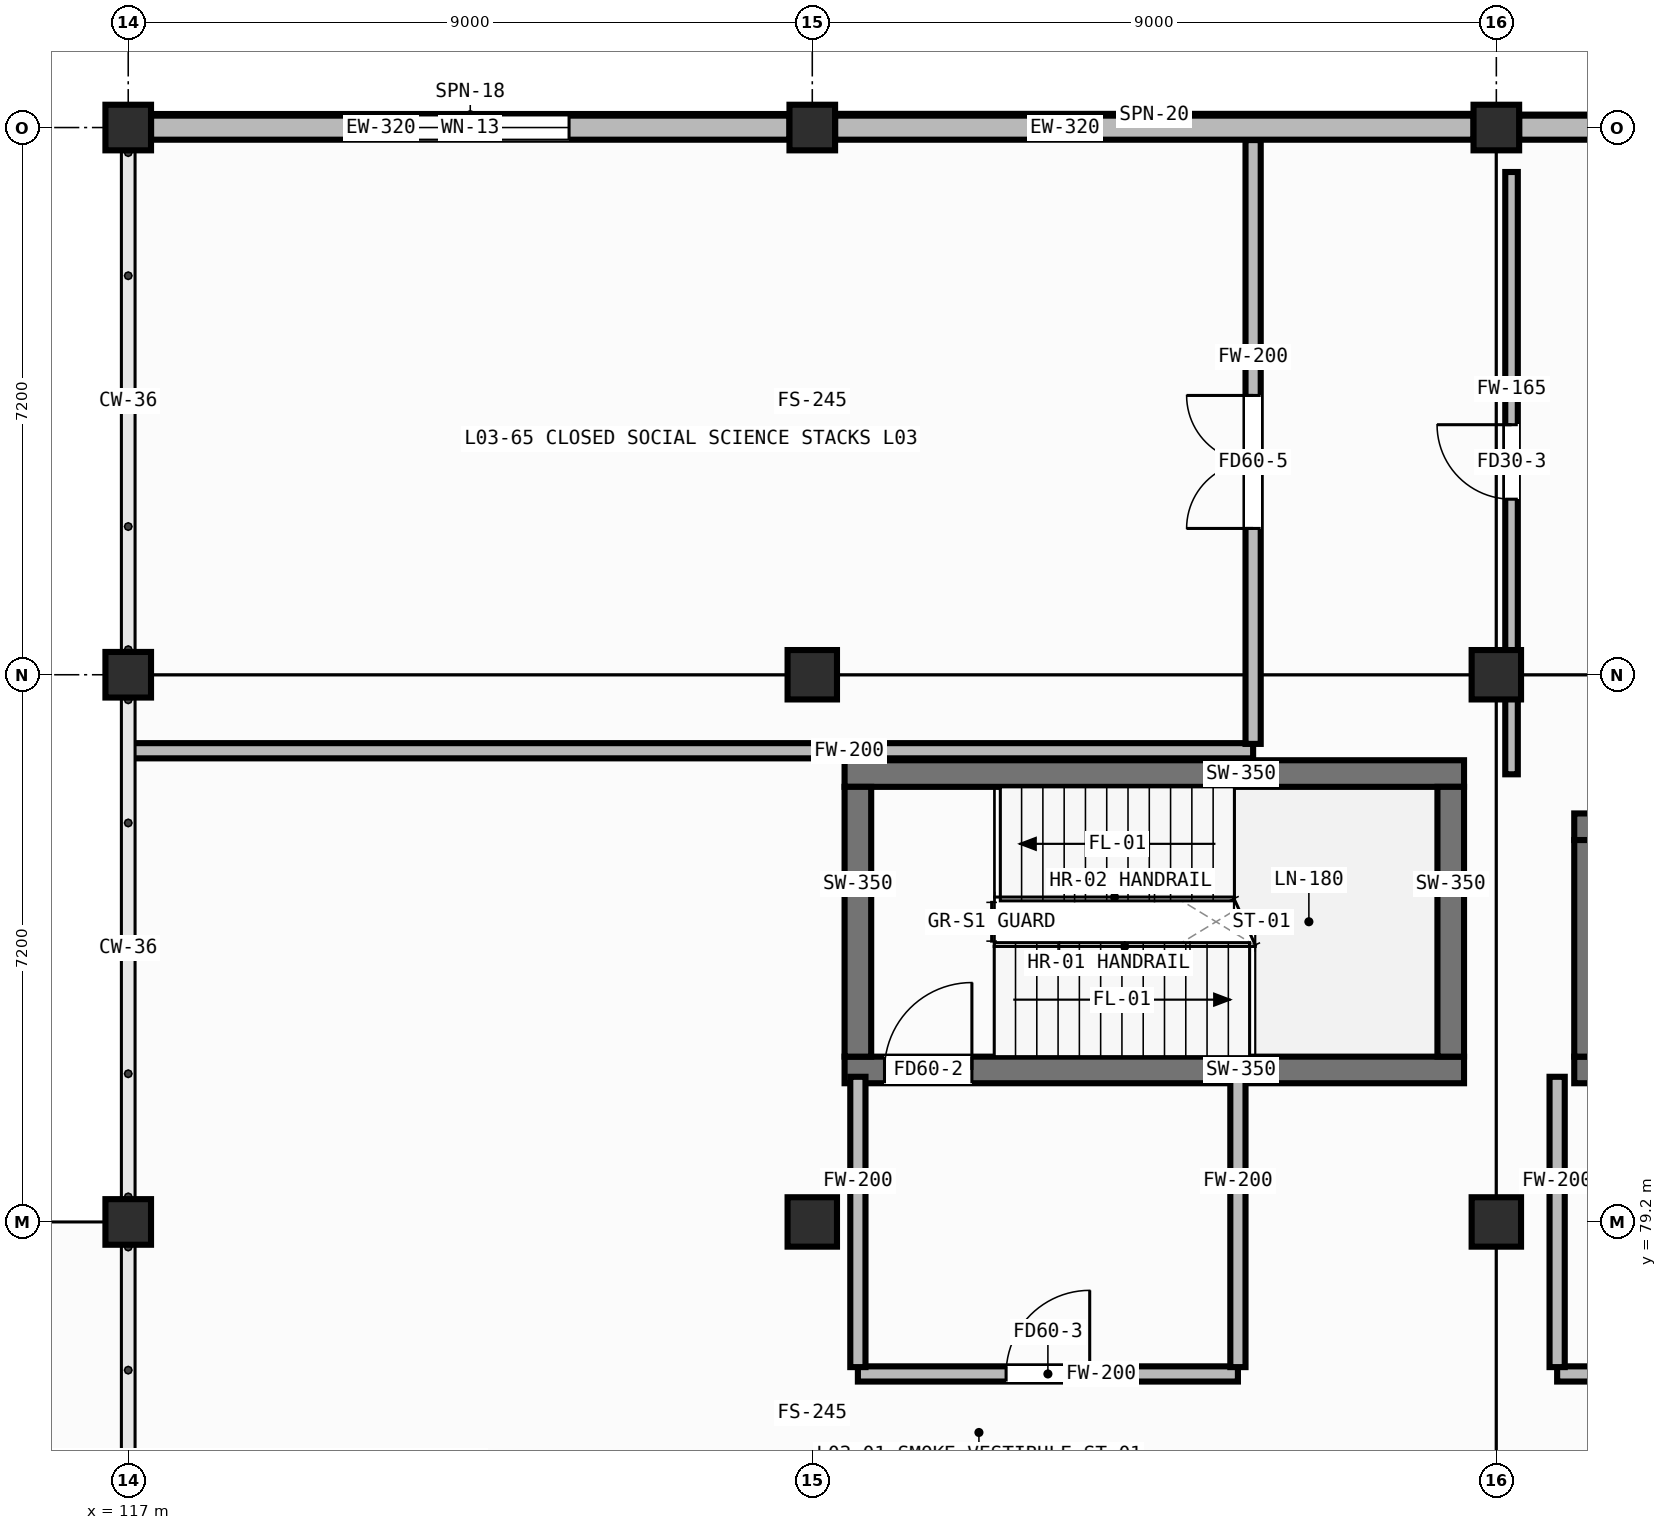
"""IFC4 building model, lengths in metres.
Left out: names, types, materials, properties, quantities, classifications, styles, units other than length and angle.
Written with IfcOpenShell. Run it as: python <this file> out.ifc"""

import sys

from ifc_helpers import new_model, si_unit, direction, frame, frame_2d, origin, origin_2d, place, context, subcontext, project, spatial, rectangle, hollow_rectangle, extrude, element, fill, save


model = new_model("IFC4")
c1 = context("Model", 3, precision=1e-05, world=origin(), true_north=direction((0.0, 1.0)))
c2 = subcontext(c1, "Body", "Model", "MODEL_VIEW")
j1 = project(units=[si_unit("LENGTHUNIT", "METRE"), si_unit("PLANEANGLEUNIT", "RADIAN")], contexts=[c1])
p1 = place(None, origin())
s1 = spatial("IfcSite", under=j1, at=p1, CompositionType="ELEMENT")
p2 = place(p1, origin())
s2 = spatial("IfcBuilding", under=s1, at=p2, CompositionType="ELEMENT")
p3 = place(p2, frame((0.0, 0.0, 8.8)))
s3 = spatial("IfcBuildingStorey", under=s2, at=p3, CompositionType="ELEMENT", Elevation=8.8)
for number, where, z_axis, x_axis in (
    (1, (117.0, 79.2, 0.0), (0.0, 0.0, 1.0), (1.0, 0.0, 0.0)),
    (2, (117.0, 86.4, 0.0), (0.0, 0.0, 1.0), (1.0, 0.0, 0.0)),
    (3, (117.0, 93.6, 0.0), (0.0, 0.0, 1.0), (1.0, 0.0, 0.0)),
):
    element("IfcColumn", number, at=place(p3, frame(where, z_axis=z_axis, x_axis=x_axis)), inside=s3, PredefinedType="COLUMN", context=c2, shape_type="SweptSolid", body=[
        extrude(hollow_rectangle(XDim=0.6, YDim=0.6, WallThickness=0.025, at=origin_2d()), origin(), (0.0, 0.0, 1.0), 4.0),
    ])
for number, where, z_axis, x_axis in (
    (4, (126.0, 79.2, 0.0), (0.0, 0.0, 1.0), (1.0, 0.0, 0.0)),
    (5, (126.0, 86.4, 0.0), (0.0, 0.0, 1.0), (1.0, 0.0, 0.0)),
):
    element("IfcColumn", number, at=place(p3, frame(where, z_axis=z_axis, x_axis=x_axis)), inside=s3, PredefinedType="COLUMN", context=c2, shape_type="SweptSolid", body=[
        extrude(hollow_rectangle(XDim=0.65, YDim=0.65, WallThickness=0.025, at=origin_2d()), origin(), (0.0, 0.0, 1.0), 4.0),
    ])
p4 = place(p3, frame((126.0, 93.6, 0.0), z_axis=(0.0, 0.0, 1.0), x_axis=(1.0, 0.0, 0.0)))
e6 = element("IfcColumn", 6, at=p4, inside=s3, PredefinedType="COLUMN", context=c2, shape_type="SweptSolid", body=[
    extrude(hollow_rectangle(XDim=0.6, YDim=0.6, WallThickness=0.025, at=origin_2d()), origin(), (0.0, 0.0, 1.0), 4.0),
])
for number, where, z_axis, x_axis in (
    (7, (135.0, 79.2, 0.0), (0.0, 0.0, 1.0), (1.0, 0.0, 0.0)),
    (8, (135.0, 86.4, 0.0), (0.0, 0.0, 1.0), (1.0, 0.0, 0.0)),
):
    element("IfcColumn", number, at=place(p3, frame(where, z_axis=z_axis, x_axis=x_axis)), inside=s3, PredefinedType="COLUMN", context=c2, shape_type="SweptSolid", body=[
        extrude(hollow_rectangle(XDim=0.65, YDim=0.65, WallThickness=0.025, at=origin_2d()), origin(), (0.0, 0.0, 1.0), 4.0),
    ])
p5 = place(p3, frame((135.0, 93.6, 0.0), z_axis=(0.0, 0.0, 1.0), x_axis=(1.0, 0.0, 0.0)))
e9 = element("IfcColumn", 9, at=p5, inside=s3, PredefinedType="COLUMN", context=c2, shape_type="SweptSolid", body=[
    extrude(hollow_rectangle(XDim=0.6, YDim=0.6, WallThickness=0.025, at=origin_2d()), origin(), (0.0, 0.0, 1.0), 4.0),
])
p6 = place(p3, frame((125.7, 93.6, 0.0), z_axis=(0.0, 0.0, 1.0), x_axis=(-1.0, 0.0, 0.0)))
e10 = element("IfcWall", 10, at=p6, inside=s3, PredefinedType="STANDARD", context=c2, shape_type="SweptSolid", body=[
    extrude(rectangle(XDim=8.4, YDim=0.32, at=frame_2d((4.2, 0.0))), origin(), (0.0, 0.0, 1.0), 3.295),
])
p7 = place(p6, frame((2.9, 0.0, 0.85)))
e11 = element("IfcOpeningElement", 11, at=p7, cuts=e10, PredefinedType="OPENING", context=c2, shape_type="SweptSolid", body=[
    extrude(rectangle(XDim=2.6, YDim=1.6, at=frame_2d((1.3, 0.8))), frame((0.0, 0.172, 0.0), z_axis=(0.0, -1.0, 0.0), x_axis=(1.0, 0.0, 0.0)), (0.0, 0.0, 1.0), 0.344),
])
p8 = place(p3, frame((134.7, 93.6, 0.0), z_axis=(0.0, 0.0, 1.0), x_axis=(-1.0, 0.0, 0.0)))
e12 = element("IfcWall", 12, at=p8, inside=s3, PredefinedType="STANDARD", context=c2, shape_type="SweptSolid", body=[
    extrude(rectangle(XDim=8.4, YDim=0.32, at=frame_2d((4.2, 0.0))), origin(), (0.0, 0.0, 1.0), 3.295),
])
p9 = place(p3, frame((143.7, 93.6, 0.0), z_axis=(0.0, 0.0, 1.0), x_axis=(-1.0, 0.0, 0.0)))
e13 = element("IfcWall", 13, at=p9, inside=s3, PredefinedType="STANDARD", context=c2, shape_type="SweptSolid", body=[
    extrude(rectangle(XDim=8.4, YDim=0.32, at=frame_2d((4.2, 0.0))), origin(), (0.0, 0.0, 1.0), 3.295),
])
p10 = place(p9, frame((2.9, 0.0, 0.85)))
e14 = element("IfcOpeningElement", 14, at=p10, cuts=e13, PredefinedType="OPENING", context=c2, shape_type="SweptSolid", body=[
    extrude(rectangle(XDim=2.6, YDim=1.6, at=frame_2d((1.3, 0.8))), frame((0.0, 0.172, 0.0), z_axis=(0.0, -1.0, 0.0), x_axis=(1.0, 0.0, 0.0)), (0.0, 0.0, 1.0), 0.344),
])
p11 = place(p3, frame((126.425, 81.2, 0.0), z_axis=(0.0, 0.0, 1.0), x_axis=(1.0, 0.0, 0.0)))
e15 = element("IfcWall", 15, at=p11, inside=s3, PredefinedType="SHEAR", context=c2, shape_type="SweptSolid", body=[
    extrude(rectangle(XDim=8.15, YDim=0.35, at=frame_2d((4.075, 0.0))), origin(), (0.0, 0.0, 1.0), 3.745),
])
p12 = place(p11, frame((0.525, 0.0, 0.0)))
e16 = element("IfcOpeningElement", 16, at=p12, cuts=e15, PredefinedType="OPENING", context=c2, shape_type="SweptSolid", body=[
    extrude(rectangle(XDim=1.15, YDim=2.1, at=frame_2d((0.575, 1.05))), frame((0.0, 0.187, 0.0), z_axis=(0.0, -1.0, 0.0), x_axis=(1.0, 0.0, 0.0)), (0.0, 0.0, 1.0), 0.374),
])
p13 = place(p3, frame((126.425, 85.1, 0.0), z_axis=(0.0, 0.0, 1.0), x_axis=(1.0, 0.0, 0.0)))
e17 = element("IfcWall", 17, at=p13, inside=s3, PredefinedType="SHEAR", context=c2, shape_type="SweptSolid", body=[
    extrude(rectangle(XDim=8.15, YDim=0.35, at=frame_2d((4.075, 0.0))), origin(), (0.0, 0.0, 1.0), 3.745),
])
for number, where, z_axis, x_axis in (
    (18, (126.6, 81.375, 0.0), (0.0, 0.0, 1.0), (0.0, 1.0, 0.0)),
    (19, (134.4, 81.375, 0.0), (0.0, 0.0, 1.0), (0.0, 1.0, 0.0)),
):
    element("IfcWall", number, at=place(p3, frame(where, z_axis=z_axis, x_axis=x_axis)), inside=s3, PredefinedType="SHEAR", context=c2, shape_type="SweptSolid", body=[
        extrude(rectangle(XDim=3.55, YDim=0.35, at=frame_2d((1.775, 0.0))), origin(), (0.0, 0.0, 1.0), 3.745),
    ])
p14 = place(p3, frame((136.025, 81.2, 0.0), z_axis=(0.0, 0.0, 1.0), x_axis=(1.0, 0.0, 0.0)))
e20 = element("IfcWall", 20, at=p14, inside=s3, PredefinedType="SHEAR", context=c2, shape_type="SweptSolid", body=[
    extrude(rectangle(XDim=2.75, YDim=0.35, at=frame_2d((1.375, 0.0))), origin(), (0.0, 0.0, 1.0), 3.745),
])
p15 = place(p14, frame((0.8, 0.0, 0.0)))
e21 = element("IfcOpeningElement", 21, at=p15, cuts=e20, PredefinedType="OPENING", context=c2, shape_type="SweptSolid", body=[
    extrude(rectangle(XDim=1.15, YDim=2.12, at=frame_2d((0.575, 1.06))), frame((0.0, 0.187, 0.0), z_axis=(0.0, -1.0, 0.0), x_axis=(1.0, 0.0, 0.0)), (0.0, 0.0, 1.0), 0.374),
])
p16 = place(p3, frame((136.025, 84.4, 0.0), z_axis=(0.0, 0.0, 1.0), x_axis=(1.0, 0.0, 0.0)))
e22 = element("IfcWall", 22, at=p16, inside=s3, PredefinedType="SHEAR", context=c2, shape_type="SweptSolid", body=[
    extrude(rectangle(XDim=2.75, YDim=0.35, at=frame_2d((1.375, 0.0))), origin(), (0.0, 0.0, 1.0), 3.745),
])
p17 = place(p3, frame((136.2, 81.375, 0.0), z_axis=(0.0, 0.0, 1.0), x_axis=(0.0, 1.0, 0.0)))
e23 = element("IfcWall", 23, at=p17, inside=s3, PredefinedType="SHEAR", context=c2, shape_type="SweptSolid", body=[
    extrude(rectangle(XDim=2.85, YDim=0.35, at=frame_2d((1.425, 0.0))), origin(), (0.0, 0.0, 1.0), 3.745),
])
p18 = place(p3, frame((126.6, 77.2, 0.0), z_axis=(0.0, 0.0, 1.0), x_axis=(1.0, 0.0, 0.0)))
e24 = element("IfcWall", 24, at=p18, inside=s3, PredefinedType="PARTITIONING", context=c2, shape_type="SweptSolid", body=[
    extrude(rectangle(XDim=5.0, YDim=0.2, at=frame_2d((2.5, 0.0))), origin(), (0.0, 0.0, 1.0), 3.745),
])
p19 = place(p18, frame((1.95, 0.0, 0.0)))
e25 = element("IfcOpeningElement", 25, at=p19, cuts=e24, PredefinedType="OPENING", context=c2, shape_type="SweptSolid", body=[
    extrude(rectangle(XDim=1.1, YDim=2.08, at=frame_2d((0.55, 1.04))), frame((0.0, 0.112, 0.0), z_axis=(0.0, -1.0, 0.0), x_axis=(1.0, 0.0, 0.0)), (0.0, 0.0, 1.0), 0.224),
])
for number, where, z_axis, x_axis in (
    (26, (126.6, 77.29, 0.0), (0.0, 0.0, 1.0), (0.0, 1.0, 0.0)),
    (27, (131.6, 77.29, 0.0), (0.0, 0.0, 1.0), (0.0, 1.0, 0.0)),
):
    element("IfcWall", number, at=place(p3, frame(where, z_axis=z_axis, x_axis=x_axis)), inside=s3, PredefinedType="PARTITIONING", context=c2, shape_type="SweptSolid", body=[
        extrude(rectangle(XDim=3.82, YDim=0.2, at=frame_2d((1.91, 0.0))), origin(), (0.0, 0.0, 1.0), 3.745),
    ])
p20 = place(p3, frame((135.8, 77.2, 0.0), z_axis=(0.0, 0.0, 1.0), x_axis=(1.0, 0.0, 0.0)))
e28 = element("IfcWall", 28, at=p20, inside=s3, PredefinedType="PARTITIONING", context=c2, shape_type="SweptSolid", body=[
    extrude(rectangle(XDim=7.8, YDim=0.2, at=frame_2d((3.9, 0.0))), origin(), (0.0, 0.0, 1.0), 3.745),
])
p21 = place(p20, frame((3.1, 0.0, 0.0)))
e29 = element("IfcOpeningElement", 29, at=p21, cuts=e28, PredefinedType="OPENING", context=c2, shape_type="SweptSolid", body=[
    extrude(rectangle(XDim=1.2, YDim=2.1, at=frame_2d((0.6, 1.05))), frame((0.0, 0.112, 0.0), z_axis=(0.0, -1.0, 0.0), x_axis=(1.0, 0.0, 0.0)), (0.0, 0.0, 1.0), 0.224),
])
p22 = place(p3, frame((135.8, 77.29, 0.0), z_axis=(0.0, 0.0, 1.0), x_axis=(0.0, 1.0, 0.0)))
e30 = element("IfcWall", 30, at=p22, inside=s3, PredefinedType="PARTITIONING", context=c2, shape_type="SweptSolid", body=[
    extrude(rectangle(XDim=3.82, YDim=0.2, at=frame_2d((1.91, 0.0))), origin(), (0.0, 0.0, 1.0), 3.745),
])
p23 = place(p3, frame((117.035, 85.4, 0.0), z_axis=(0.0, 0.0, 1.0), x_axis=(1.0, 0.0, 0.0)))
e31 = element("IfcWall", 31, at=p23, inside=s3, PredefinedType="PARTITIONING", context=c2, shape_type="SweptSolid", body=[
    extrude(rectangle(XDim=14.765, YDim=0.2, at=frame_2d((7.383, 0.0))), origin(), (0.0, 0.0, 1.0), 3.745),
])
p24 = place(p3, frame((131.8, 85.49, 0.0), z_axis=(0.0, 0.0, 1.0), x_axis=(0.0, 1.0, 0.0)))
e32 = element("IfcWall", 32, at=p24, inside=s3, PredefinedType="PARTITIONING", context=c2, shape_type="SweptSolid", body=[
    extrude(rectangle(XDim=7.945, YDim=0.2, at=frame_2d((3.973, 0.0))), origin(), (0.0, 0.0, 1.0), 3.745),
])
p25 = place(p24, frame((2.835, 0.0, 0.0)))
e33 = element("IfcOpeningElement", 33, at=p25, cuts=e32, PredefinedType="OPENING", context=c2, shape_type="SweptSolid", body=[
    extrude(rectangle(XDim=1.75, YDim=2.12, at=frame_2d((0.875, 1.06))), frame((0.0, 0.112, 0.0), z_axis=(0.0, -1.0, 0.0), x_axis=(1.0, 0.0, 0.0)), (0.0, 0.0, 1.0), 0.224),
])
p26 = place(p3, frame((135.2, 85.09, 0.0), z_axis=(0.0, 0.0, 1.0), x_axis=(0.0, 1.0, 0.0)))
e34 = element("IfcWall", 34, at=p26, inside=s3, PredefinedType="PARTITIONING", context=c2, shape_type="SweptSolid", body=[
    extrude(rectangle(XDim=7.925, YDim=0.165, at=frame_2d((3.962, 0.0))), origin(), (0.0, 0.0, 1.0), 3.025),
])
p27 = place(p26, frame((3.62, 0.0, 0.0)))
e35 = element("IfcOpeningElement", 35, at=p27, cuts=e34, PredefinedType="OPENING", context=c2, shape_type="SweptSolid", body=[
    extrude(rectangle(XDim=0.98, YDim=2.02, at=frame_2d((0.49, 1.01))), frame((0.0, 0.094, 0.0), z_axis=(0.0, -1.0, 0.0), x_axis=(1.0, 0.0, 0.0)), (0.0, 0.0, 1.0), 0.189),
])
p28 = place(p7, origin())
e36 = element("IfcWindow", 36, at=p28, inside=s3, PartitioningType="DOUBLE_PANEL_VERTICAL", PredefinedType="WINDOW", context=c2, shape_type="SweptSolid", body=[
    extrude(rectangle(XDim=2.6, YDim=1.6, at=frame_2d((1.3, 0.8))), frame((0.0, 0.03, 0.0), z_axis=(0.0, -1.0, 0.0), x_axis=(1.0, 0.0, 0.0)), (0.0, 0.0, 1.0), 0.06),
])
fill(e11, e36)
p29 = place(p12, origin())
e37 = element("IfcDoor", 37, at=p29, inside=s3, OperationType="SINGLE_SWING_RIGHT", PredefinedType="DOOR", context=c2, shape_type="SweptSolid", body=[
    extrude(rectangle(XDim=1.15, YDim=2.1, at=frame_2d((0.575, 1.05))), frame((0.0, 0.025, 0.0), z_axis=(0.0, -1.0, 0.0), x_axis=(1.0, 0.0, 0.0)), (0.0, 0.0, 1.0), 0.05),
])
fill(e16, e37)
p30 = place(p19, origin())
e38 = element("IfcDoor", 38, at=p30, inside=s3, OperationType="SINGLE_SWING_RIGHT", PredefinedType="DOOR", context=c2, shape_type="SweptSolid", body=[
    extrude(rectangle(XDim=1.1, YDim=2.08, at=frame_2d((0.55, 1.04))), frame((0.0, 0.025, 0.0), z_axis=(0.0, -1.0, 0.0), x_axis=(1.0, 0.0, 0.0)), (0.0, 0.0, 1.0), 0.05),
])
fill(e25, e38)
p31 = place(p25, origin())
e39 = element("IfcDoor", 39, at=p31, inside=s3, OperationType="DOUBLE_DOOR_SINGLE_SWING", PredefinedType="DOOR", context=c2, shape_type="SweptSolid", body=[
    extrude(rectangle(XDim=1.75, YDim=2.12, at=frame_2d((0.875, 1.06))), frame((0.0, 0.025, 0.0), z_axis=(0.0, -1.0, 0.0), x_axis=(1.0, 0.0, 0.0)), (0.0, 0.0, 1.0), 0.05),
])
fill(e33, e39)
p32 = place(p27, origin())
e40 = element("IfcDoor", 40, at=p32, inside=s3, OperationType="SINGLE_SWING_RIGHT", PredefinedType="DOOR", context=c2, shape_type="SweptSolid", body=[
    extrude(rectangle(XDim=0.98, YDim=2.02, at=frame_2d((0.49, 1.01))), frame((0.0, 0.025, 0.0), z_axis=(0.0, -1.0, 0.0), x_axis=(1.0, 0.0, 0.0)), (0.0, 0.0, 1.0), 0.05),
])
fill(e35, e40)
save(model, sys.argv[1])
